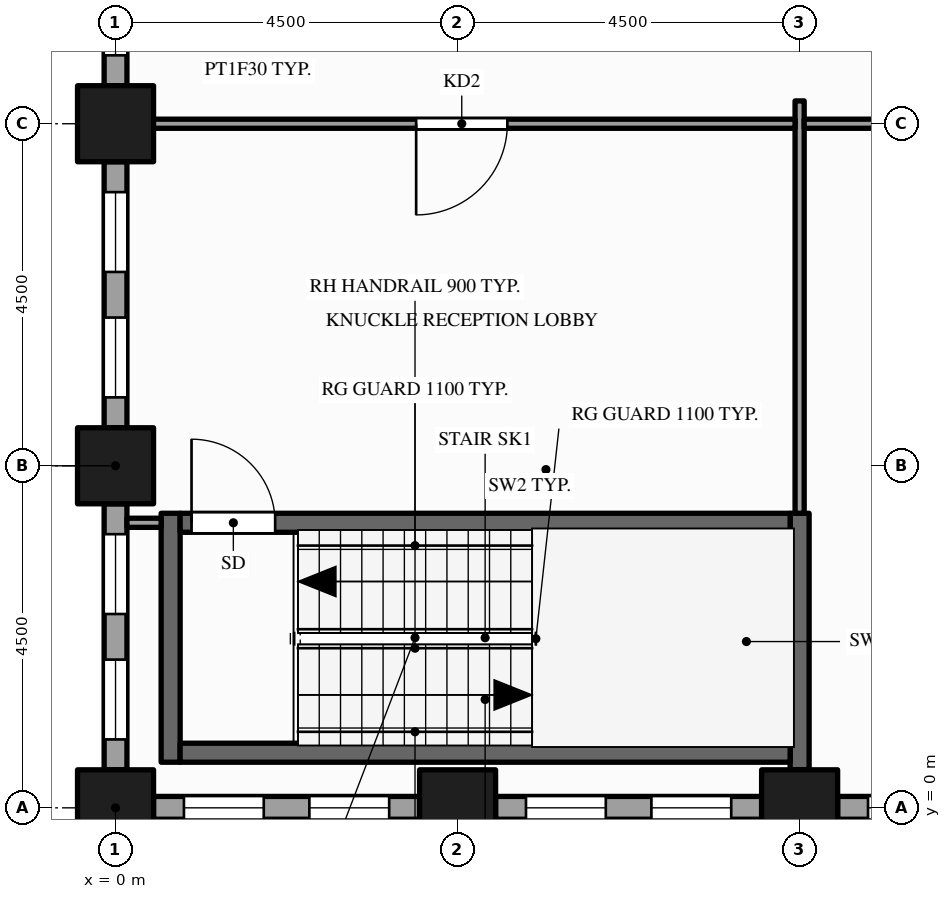
"""IFC4 building model, lengths in metres.
Left out: names, types, materials, properties, quantities, classifications, styles, units other than length and angle.
Written with IfcOpenShell. Run it as: python <this file> out.ifc"""

import sys

from ifc_helpers import new_model, si_unit, direction, frame, frame_2d, origin, origin_2d, place, context, subcontext, project, spatial, rectangle, hollow_rectangle, extrude, element, fill, save


model = new_model("IFC4")
c1 = context("Model", 3, precision=1e-05, world=origin(), true_north=direction((0.0, 1.0)))
c2 = subcontext(c1, "Body", "Model", "MODEL_VIEW")
j1 = project(units=[si_unit("LENGTHUNIT", "METRE"), si_unit("PLANEANGLEUNIT", "RADIAN")], contexts=[c1])
p1 = place(None, origin())
s1 = spatial("IfcSite", under=j1, at=p1, CompositionType="ELEMENT")
p2 = place(p1, origin())
s2 = spatial("IfcBuilding", under=s1, at=p2, CompositionType="ELEMENT")
p3 = place(p2, frame((0.0, 0.0, 119.0)))
s3 = spatial("IfcBuildingStorey", under=s2, at=p3, CompositionType="ELEMENT", Elevation=119.0)
for number, where, z_axis, x_axis in (
    (1, (0.0, 0.0, -0.15), (0.0, 0.0, 1.0), (1.0, 0.0, 0.0)),
    (2, (0.0, 4.5, -0.15), (0.0, 0.0, 1.0), (1.0, 0.0, 0.0)),
    (3, (0.0, 9.0, -0.15), (0.0, 0.0, 1.0), (1.0, 0.0, 0.0)),
    (4, (4.5, 0.0, -0.15), (0.0, 0.0, 1.0), (1.0, 0.0, 0.0)),
    (5, (9.0, 0.0, -0.15), (0.0, 0.0, 1.0), (1.0, 0.0, 0.0)),
):
    element("IfcColumn", number, at=place(p3, frame(where, z_axis=z_axis, x_axis=x_axis)), inside=s3, PredefinedType="COLUMN", context=c2, shape_type="SweptSolid", body=[
        extrude(hollow_rectangle(XDim=1.0, YDim=1.0, WallThickness=0.05, at=origin_2d()), origin(), (0.0, 0.0, 1.0), 4.0),
    ])
p4 = place(p3, frame((0.0, 13.0, 0.0), z_axis=(0.0, 0.0, 1.0), x_axis=(0.0, -1.0, 0.0)))
e6 = element("IfcWall", 6, at=p4, inside=s3, PredefinedType="STANDARD", context=c2, shape_type="SweptSolid", body=[
    extrude(rectangle(XDim=3.5, YDim=0.3, at=frame_2d((1.75, 0.0))), origin(), (0.0, 0.0, 1.0), 3.154),
])
p5 = place(p4, frame((0.4, 0.0, 0.9)))
e7 = element("IfcOpeningElement", 7, at=p5, cuts=e6, PredefinedType="OPENING", context=c2, shape_type="SweptSolid", body=[
    extrude(rectangle(XDim=1.05, YDim=2.0, at=frame_2d((0.525, 1.0))), frame((0.0, 0.16, 0.0), z_axis=(0.0, -1.0, 0.0), x_axis=(1.0, 0.0, 0.0)), (0.0, 0.0, 1.0), 0.32),
])
p6 = place(p4, frame((2.05, 0.0, 0.9)))
e8 = element("IfcOpeningElement", 8, at=p6, cuts=e6, PredefinedType="OPENING", context=c2, shape_type="SweptSolid", body=[
    extrude(rectangle(XDim=1.05, YDim=2.0, at=frame_2d((0.525, 1.0))), frame((0.0, 0.16, 0.0), z_axis=(0.0, -1.0, 0.0), x_axis=(1.0, 0.0, 0.0)), (0.0, 0.0, 1.0), 0.32),
])
p7 = place(p3, frame((0.0, 8.5, 0.0), z_axis=(0.0, 0.0, 1.0), x_axis=(0.0, -1.0, 0.0)))
e9 = element("IfcWall", 9, at=p7, inside=s3, PredefinedType="STANDARD", context=c2, shape_type="SweptSolid", body=[
    extrude(rectangle(XDim=3.5, YDim=0.3, at=frame_2d((1.75, 0.0))), origin(), (0.0, 0.0, 1.0), 3.154),
])
p8 = place(p7, frame((0.4, 0.0, 0.9)))
e10 = element("IfcOpeningElement", 10, at=p8, cuts=e9, PredefinedType="OPENING", context=c2, shape_type="SweptSolid", body=[
    extrude(rectangle(XDim=1.05, YDim=2.0, at=frame_2d((0.525, 1.0))), frame((0.0, 0.16, 0.0), z_axis=(0.0, -1.0, 0.0), x_axis=(1.0, 0.0, 0.0)), (0.0, 0.0, 1.0), 0.32),
])
p9 = place(p7, frame((2.05, 0.0, 0.9)))
e11 = element("IfcOpeningElement", 11, at=p9, cuts=e9, PredefinedType="OPENING", context=c2, shape_type="SweptSolid", body=[
    extrude(rectangle(XDim=1.05, YDim=2.0, at=frame_2d((0.525, 1.0))), frame((0.0, 0.16, 0.0), z_axis=(0.0, -1.0, 0.0), x_axis=(1.0, 0.0, 0.0)), (0.0, 0.0, 1.0), 0.32),
])
p10 = place(p3, frame((0.0, 4.0, 0.0), z_axis=(0.0, 0.0, 1.0), x_axis=(0.0, -1.0, 0.0)))
e12 = element("IfcWall", 12, at=p10, inside=s3, PredefinedType="STANDARD", context=c2, shape_type="SweptSolid", body=[
    extrude(rectangle(XDim=3.5, YDim=0.3, at=frame_2d((1.75, 0.0))), origin(), (0.0, 0.0, 1.0), 3.154),
])
p11 = place(p10, frame((0.4, 0.0, 0.9)))
e13 = element("IfcOpeningElement", 13, at=p11, cuts=e12, PredefinedType="OPENING", context=c2, shape_type="SweptSolid", body=[
    extrude(rectangle(XDim=1.05, YDim=2.0, at=frame_2d((0.525, 1.0))), frame((0.0, 0.16, 0.0), z_axis=(0.0, -1.0, 0.0), x_axis=(1.0, 0.0, 0.0)), (0.0, 0.0, 1.0), 0.32),
])
p12 = place(p10, frame((2.05, 0.0, 0.9)))
e14 = element("IfcOpeningElement", 14, at=p12, cuts=e12, PredefinedType="OPENING", context=c2, shape_type="SweptSolid", body=[
    extrude(rectangle(XDim=1.05, YDim=2.0, at=frame_2d((0.525, 1.0))), frame((0.0, 0.16, 0.0), z_axis=(0.0, -1.0, 0.0), x_axis=(1.0, 0.0, 0.0)), (0.0, 0.0, 1.0), 0.32),
])
p13 = place(p3, frame((0.5, 0.0, 0.0), z_axis=(0.0, 0.0, 1.0), x_axis=(1.0, 0.0, 0.0)))
e15 = element("IfcWall", 15, at=p13, inside=s3, PredefinedType="STANDARD", context=c2, shape_type="SweptSolid", body=[
    extrude(rectangle(XDim=3.5, YDim=0.3, at=frame_2d((1.75, 0.0))), origin(), (0.0, 0.0, 1.0), 3.154),
])
p14 = place(p13, frame((0.4, 0.0, 0.9)))
e16 = element("IfcOpeningElement", 16, at=p14, cuts=e15, PredefinedType="OPENING", context=c2, shape_type="SweptSolid", body=[
    extrude(rectangle(XDim=1.05, YDim=2.0, at=frame_2d((0.525, 1.0))), frame((0.0, 0.16, 0.0), z_axis=(0.0, -1.0, 0.0), x_axis=(1.0, 0.0, 0.0)), (0.0, 0.0, 1.0), 0.32),
])
p15 = place(p13, frame((2.05, 0.0, 0.9)))
e17 = element("IfcOpeningElement", 17, at=p15, cuts=e15, PredefinedType="OPENING", context=c2, shape_type="SweptSolid", body=[
    extrude(rectangle(XDim=1.05, YDim=2.0, at=frame_2d((0.525, 1.0))), frame((0.0, 0.16, 0.0), z_axis=(0.0, -1.0, 0.0), x_axis=(1.0, 0.0, 0.0)), (0.0, 0.0, 1.0), 0.32),
])
p16 = place(p3, frame((5.0, 0.0, 0.0), z_axis=(0.0, 0.0, 1.0), x_axis=(1.0, 0.0, 0.0)))
e18 = element("IfcWall", 18, at=p16, inside=s3, PredefinedType="STANDARD", context=c2, shape_type="SweptSolid", body=[
    extrude(rectangle(XDim=3.5, YDim=0.3, at=frame_2d((1.75, 0.0))), origin(), (0.0, 0.0, 1.0), 3.154),
])
p17 = place(p16, frame((0.4, 0.0, 0.9)))
e19 = element("IfcOpeningElement", 19, at=p17, cuts=e18, PredefinedType="OPENING", context=c2, shape_type="SweptSolid", body=[
    extrude(rectangle(XDim=1.05, YDim=2.0, at=frame_2d((0.525, 1.0))), frame((0.0, 0.16, 0.0), z_axis=(0.0, -1.0, 0.0), x_axis=(1.0, 0.0, 0.0)), (0.0, 0.0, 1.0), 0.32),
])
p18 = place(p16, frame((2.05, 0.0, 0.9)))
e20 = element("IfcOpeningElement", 20, at=p18, cuts=e18, PredefinedType="OPENING", context=c2, shape_type="SweptSolid", body=[
    extrude(rectangle(XDim=1.05, YDim=2.0, at=frame_2d((0.525, 1.0))), frame((0.0, 0.16, 0.0), z_axis=(0.0, -1.0, 0.0), x_axis=(1.0, 0.0, 0.0)), (0.0, 0.0, 1.0), 0.32),
])
p19 = place(p3, frame((9.5, 0.0, 0.0), z_axis=(0.0, 0.0, 1.0), x_axis=(1.0, 0.0, 0.0)))
e21 = element("IfcWall", 21, at=p19, inside=s3, PredefinedType="STANDARD", context=c2, shape_type="SweptSolid", body=[
    extrude(rectangle(XDim=3.5, YDim=0.3, at=frame_2d((1.75, 0.0))), origin(), (0.0, 0.0, 1.0), 3.154),
])
p20 = place(p19, frame((0.4, 0.0, 0.9)))
e22 = element("IfcOpeningElement", 22, at=p20, cuts=e21, PredefinedType="OPENING", context=c2, shape_type="SweptSolid", body=[
    extrude(rectangle(XDim=1.05, YDim=2.0, at=frame_2d((0.525, 1.0))), frame((0.0, 0.16, 0.0), z_axis=(0.0, -1.0, 0.0), x_axis=(1.0, 0.0, 0.0)), (0.0, 0.0, 1.0), 0.32),
])
p21 = place(p19, frame((2.05, 0.0, 0.9)))
e23 = element("IfcOpeningElement", 23, at=p21, cuts=e21, PredefinedType="OPENING", context=c2, shape_type="SweptSolid", body=[
    extrude(rectangle(XDim=1.05, YDim=2.0, at=frame_2d((0.525, 1.0))), frame((0.0, 0.16, 0.0), z_axis=(0.0, -1.0, 0.0), x_axis=(1.0, 0.0, 0.0)), (0.0, 0.0, 1.0), 0.32),
])
p22 = place(p3, frame((0.725, 0.6, 0.0), z_axis=(0.0, 0.0, 1.0), x_axis=(0.0, 1.0, 0.0)))
e24 = element("IfcWall", 24, at=p22, inside=s3, PredefinedType="SHEAR", context=c2, shape_type="SweptSolid", body=[
    extrude(rectangle(XDim=3.275, YDim=0.25, at=frame_2d((1.637, 0.0))), origin(), (0.0, 0.0, 1.0), 3.85),
])
p23 = place(p3, frame((9.0, 0.15, 0.0), z_axis=(0.0, 0.0, 1.0), x_axis=(0.0, 1.0, 0.0)))
e25 = element("IfcWall", 25, at=p23, inside=s3, PredefinedType="PARTITIONING", context=c2, shape_type="SweptSolid", body=[
    extrude(rectangle(XDim=0.35, YDim=0.12, at=frame_2d((0.175, 0.0))), origin(), (0.0, 0.0, 1.0), 3.85),
])
p24 = place(p3, frame((9.0, 0.5, 0.0), z_axis=(0.0, 0.0, 1.0), x_axis=(0.0, 1.0, 0.0)))
e26 = element("IfcWall", 26, at=p24, inside=s3, PredefinedType="SHEAR", context=c2, shape_type="SweptSolid", body=[
    extrude(rectangle(XDim=3.375, YDim=0.25, at=frame_2d((1.688, 0.0))), origin(), (0.0, 0.0, 1.0), 3.85),
])
p25 = place(p3, frame((9.0, 3.875, 0.0), z_axis=(0.0, 0.0, 1.0), x_axis=(0.0, 1.0, 0.0)))
e27 = element("IfcWall", 27, at=p25, inside=s3, PredefinedType="PARTITIONING", context=c2, shape_type="SweptSolid", body=[
    extrude(rectangle(XDim=5.425, YDim=0.12, at=frame_2d((2.712, 0.0))), origin(), (0.0, 0.0, 1.0), 2.938),
])
p26 = place(p3, frame((0.85, 0.725, 0.0), z_axis=(0.0, 0.0, 1.0), x_axis=(1.0, 0.0, 0.0)))
e28 = element("IfcWall", 28, at=p26, inside=s3, PredefinedType="SHEAR", context=c2, shape_type="SweptSolid", body=[
    extrude(rectangle(XDim=8.025, YDim=0.25, at=frame_2d((4.012, 0.0))), origin(), (0.0, 0.0, 1.0), 3.85),
])
p27 = place(p3, frame((0.15, 3.75, 0.0), z_axis=(0.0, 0.0, 1.0), x_axis=(1.0, 0.0, 0.0)))
e29 = element("IfcWall", 29, at=p27, inside=s3, PredefinedType="PARTITIONING", context=c2, shape_type="SweptSolid", body=[
    extrude(rectangle(XDim=0.45, YDim=0.12, at=frame_2d((0.225, 0.0))), origin(), (0.0, 0.0, 1.0), 3.154),
])
p28 = place(p3, frame((0.85, 3.75, 0.0), z_axis=(0.0, 0.0, 1.0), x_axis=(1.0, 0.0, 0.0)))
e30 = element("IfcWall", 30, at=p28, inside=s3, PredefinedType="SHEAR", context=c2, shape_type="SweptSolid", body=[
    extrude(rectangle(XDim=8.025, YDim=0.25, at=frame_2d((4.012, 0.0))), origin(), (0.0, 0.0, 1.0), 3.85),
])
p29 = place(p28, frame((0.15, 0.0, 0.0)))
e31 = element("IfcOpeningElement", 31, at=p29, cuts=e30, PredefinedType="OPENING", context=c2, shape_type="SweptSolid", body=[
    extrude(rectangle(XDim=1.1, YDim=2.1, at=frame_2d((0.55, 1.05))), frame((0.0, 0.135, 0.0), z_axis=(0.0, -1.0, 0.0), x_axis=(1.0, 0.0, 0.0)), (0.0, 0.0, 1.0), 0.27),
])
p30 = place(p3, frame((0.15, 9.0, 0.0), z_axis=(0.0, 0.0, 1.0), x_axis=(1.0, 0.0, 0.0)))
e32 = element("IfcWall", 32, at=p30, inside=s3, PredefinedType="PARTITIONING", context=c2, shape_type="SweptSolid", body=[
    extrude(rectangle(XDim=8.79, YDim=0.12, at=frame_2d((4.395, 0.0))), origin(), (0.0, 0.0, 1.0), 2.938),
])
p31 = place(p30, frame((3.805, 0.0, 0.0)))
e33 = element("IfcOpeningElement", 33, at=p31, cuts=e32, PredefinedType="OPENING", context=c2, shape_type="SweptSolid", body=[
    extrude(rectangle(XDim=1.2, YDim=2.1, at=frame_2d((0.6, 1.05))), frame((0.0, 0.07, 0.0), z_axis=(0.0, -1.0, 0.0), x_axis=(1.0, 0.0, 0.0)), (0.0, 0.0, 1.0), 0.14),
])
p32 = place(p3, frame((9.06, 9.0, 0.0), z_axis=(0.0, 0.0, 1.0), x_axis=(1.0, 0.0, 0.0)))
e34 = element("IfcWall", 34, at=p32, inside=s3, PredefinedType="PARTITIONING", context=c2, shape_type="SweptSolid", body=[
    extrude(rectangle(XDim=4.38, YDim=0.12, at=frame_2d((2.19, 0.0))), origin(), (0.0, 0.0, 1.0), 2.938),
])
p33 = place(p32, frame((1.69, 0.0, 0.0)))
e35 = element("IfcOpeningElement", 35, at=p33, cuts=e34, PredefinedType="OPENING", context=c2, shape_type="SweptSolid", body=[
    extrude(rectangle(XDim=1.0, YDim=2.1, at=frame_2d((0.5, 1.05))), frame((0.0, 0.07, 0.0), z_axis=(0.0, -1.0, 0.0), x_axis=(1.0, 0.0, 0.0)), (0.0, 0.0, 1.0), 0.14),
])
p34 = place(p6, origin())
e36 = element("IfcWindow", 36, at=p34, inside=s3, PartitioningType="SINGLE_PANEL", PredefinedType="WINDOW", context=c2, shape_type="SweptSolid", body=[
    extrude(rectangle(XDim=1.05, YDim=2.0, at=frame_2d((0.525, 1.0))), frame((0.0, 0.03, 0.0), z_axis=(0.0, -1.0, 0.0), x_axis=(1.0, 0.0, 0.0)), (0.0, 0.0, 1.0), 0.06),
])
fill(e8, e36)
p35 = place(p8, origin())
e37 = element("IfcWindow", 37, at=p35, inside=s3, PartitioningType="SINGLE_PANEL", PredefinedType="WINDOW", context=c2, shape_type="SweptSolid", body=[
    extrude(rectangle(XDim=1.05, YDim=2.0, at=frame_2d((0.525, 1.0))), frame((0.0, 0.03, 0.0), z_axis=(0.0, -1.0, 0.0), x_axis=(1.0, 0.0, 0.0)), (0.0, 0.0, 1.0), 0.06),
])
fill(e10, e37)
p36 = place(p9, origin())
e38 = element("IfcWindow", 38, at=p36, inside=s3, PartitioningType="SINGLE_PANEL", PredefinedType="WINDOW", context=c2, shape_type="SweptSolid", body=[
    extrude(rectangle(XDim=1.05, YDim=2.0, at=frame_2d((0.525, 1.0))), frame((0.0, 0.03, 0.0), z_axis=(0.0, -1.0, 0.0), x_axis=(1.0, 0.0, 0.0)), (0.0, 0.0, 1.0), 0.06),
])
fill(e11, e38)
p37 = place(p11, origin())
e39 = element("IfcWindow", 39, at=p37, inside=s3, PartitioningType="SINGLE_PANEL", PredefinedType="WINDOW", context=c2, shape_type="SweptSolid", body=[
    extrude(rectangle(XDim=1.05, YDim=2.0, at=frame_2d((0.525, 1.0))), frame((0.0, 0.03, 0.0), z_axis=(0.0, -1.0, 0.0), x_axis=(1.0, 0.0, 0.0)), (0.0, 0.0, 1.0), 0.06),
])
fill(e13, e39)
p38 = place(p12, origin())
e40 = element("IfcWindow", 40, at=p38, inside=s3, PartitioningType="SINGLE_PANEL", PredefinedType="WINDOW", context=c2, shape_type="SweptSolid", body=[
    extrude(rectangle(XDim=1.05, YDim=2.0, at=frame_2d((0.525, 1.0))), frame((0.0, 0.03, 0.0), z_axis=(0.0, -1.0, 0.0), x_axis=(1.0, 0.0, 0.0)), (0.0, 0.0, 1.0), 0.06),
])
fill(e14, e40)
p39 = place(p14, origin())
e41 = element("IfcWindow", 41, at=p39, inside=s3, PartitioningType="SINGLE_PANEL", PredefinedType="WINDOW", context=c2, shape_type="SweptSolid", body=[
    extrude(rectangle(XDim=1.05, YDim=2.0, at=frame_2d((0.525, 1.0))), frame((0.0, 0.03, 0.0), z_axis=(0.0, -1.0, 0.0), x_axis=(1.0, 0.0, 0.0)), (0.0, 0.0, 1.0), 0.06),
])
fill(e16, e41)
p40 = place(p15, origin())
e42 = element("IfcWindow", 42, at=p40, inside=s3, PartitioningType="SINGLE_PANEL", PredefinedType="WINDOW", context=c2, shape_type="SweptSolid", body=[
    extrude(rectangle(XDim=1.05, YDim=2.0, at=frame_2d((0.525, 1.0))), frame((0.0, 0.03, 0.0), z_axis=(0.0, -1.0, 0.0), x_axis=(1.0, 0.0, 0.0)), (0.0, 0.0, 1.0), 0.06),
])
fill(e17, e42)
p41 = place(p17, origin())
e43 = element("IfcWindow", 43, at=p41, inside=s3, PartitioningType="SINGLE_PANEL", PredefinedType="WINDOW", context=c2, shape_type="SweptSolid", body=[
    extrude(rectangle(XDim=1.05, YDim=2.0, at=frame_2d((0.525, 1.0))), frame((0.0, 0.03, 0.0), z_axis=(0.0, -1.0, 0.0), x_axis=(1.0, 0.0, 0.0)), (0.0, 0.0, 1.0), 0.06),
])
fill(e19, e43)
p42 = place(p18, origin())
e44 = element("IfcWindow", 44, at=p42, inside=s3, PartitioningType="SINGLE_PANEL", PredefinedType="WINDOW", context=c2, shape_type="SweptSolid", body=[
    extrude(rectangle(XDim=1.05, YDim=2.0, at=frame_2d((0.525, 1.0))), frame((0.0, 0.03, 0.0), z_axis=(0.0, -1.0, 0.0), x_axis=(1.0, 0.0, 0.0)), (0.0, 0.0, 1.0), 0.06),
])
fill(e20, e44)
p43 = place(p20, origin())
e45 = element("IfcWindow", 45, at=p43, inside=s3, PartitioningType="SINGLE_PANEL", PredefinedType="WINDOW", context=c2, shape_type="SweptSolid", body=[
    extrude(rectangle(XDim=1.05, YDim=2.0, at=frame_2d((0.525, 1.0))), frame((0.0, 0.03, 0.0), z_axis=(0.0, -1.0, 0.0), x_axis=(1.0, 0.0, 0.0)), (0.0, 0.0, 1.0), 0.06),
])
fill(e22, e45)
p44 = place(p29, origin())
e46 = element("IfcDoor", 46, at=p44, inside=s3, OperationType="SINGLE_SWING_LEFT", PredefinedType="DOOR", context=c2, shape_type="SweptSolid", body=[
    extrude(rectangle(XDim=1.1, YDim=2.1, at=frame_2d((0.55, 1.05))), frame((0.0, 0.025, 0.0), z_axis=(0.0, -1.0, 0.0), x_axis=(1.0, 0.0, 0.0)), (0.0, 0.0, 1.0), 0.05),
])
fill(e31, e46)
p45 = place(p31, origin())
e47 = element("IfcDoor", 47, at=p45, inside=s3, OperationType="SINGLE_SWING_LEFT", PredefinedType="DOOR", context=c2, shape_type="SweptSolid", body=[
    extrude(rectangle(XDim=1.2, YDim=2.1, at=frame_2d((0.6, 1.05))), frame((0.0, 0.025, 0.0), z_axis=(0.0, -1.0, 0.0), x_axis=(1.0, 0.0, 0.0)), (0.0, 0.0, 1.0), 0.05),
])
fill(e33, e47)
save(model, sys.argv[1])
